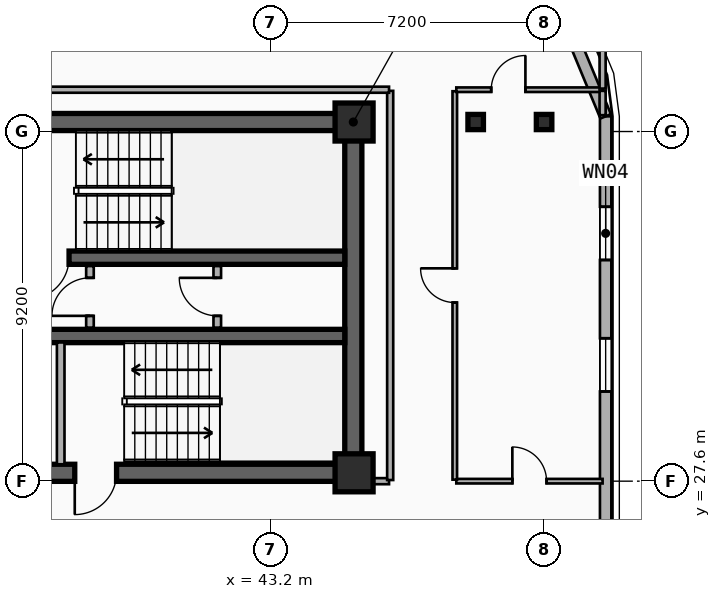
"""IFC4 building model, lengths in metres.
Left out: names, types, materials, properties, quantities, classifications, styles, units other than length and angle.
Written with IfcOpenShell. Run it as: python <this file> out.ifc"""

import sys

from ifc_helpers import new_model, si_unit, direction, frame, frame_2d, origin, origin_2d, place, context, subcontext, project, spatial, rectangle, i_section, extrude, element, fill, save


model = new_model("IFC4")
c1 = context("Model", 3, precision=1e-05, world=origin(), true_north=direction((0.0, 1.0)))
c2 = subcontext(c1, "Body", "Model", "MODEL_VIEW")
j1 = project(units=[si_unit("LENGTHUNIT", "METRE"), si_unit("PLANEANGLEUNIT", "RADIAN")], contexts=[c1])
p1 = place(None, origin())
s1 = spatial("IfcSite", under=j1, at=p1, CompositionType="ELEMENT")
p2 = place(p1, origin())
s2 = spatial("IfcBuilding", under=s1, at=p2, CompositionType="ELEMENT")
p3 = place(p2, frame((0.0, 0.0, 218.4)))
s3 = spatial("IfcBuildingStorey", under=s2, at=p3, CompositionType="ELEMENT", Elevation=218.4)
p4 = place(p3, frame((12.15, 37.05, 0.0), z_axis=(0.0, 0.0, 1.0), x_axis=(1.0, 0.0, 0.0)))
e1 = element("IfcWall", 1, at=p4, inside=s3, PredefinedType="SHEAR", context=c2, shape_type="SweptSolid", body=[
    extrude(rectangle(XDim=33.23, YDim=0.45, at=frame_2d((16.615, 0.0))), origin(), (0.0, 0.0, 1.0), 3.6),
])
p5 = place(p3, frame((45.38, 27.82, 0.0), z_axis=(0.0, 0.0, 1.0), x_axis=(-1.0, 0.0, 0.0)))
e2 = element("IfcWall", 2, at=p5, inside=s3, PredefinedType="SHEAR", context=c2, shape_type="SweptSolid", body=[
    extrude(rectangle(XDim=12.23, YDim=0.45, at=frame_2d((6.115, 0.0))), origin(), (0.0, 0.0, 1.0), 3.6),
])
p6 = place(p5, frame((9.93, 0.0, 0.0)))
e3 = element("IfcOpeningElement", 3, at=p6, cuts=e2, PredefinedType="OPENING", context=c2, shape_type="SweptSolid", body=[
    extrude(rectangle(XDim=1.1, YDim=2.15, at=frame_2d((0.55, 1.075))), frame((0.0, 0.235, 0.0), z_axis=(0.0, -1.0, 0.0), x_axis=(1.0, 0.0, 0.0)), (0.0, 0.0, 1.0), 0.47),
])
p7 = place(p5, frame((6.23, 0.0, 0.0)))
e4 = element("IfcOpeningElement", 4, at=p7, cuts=e2, PredefinedType="OPENING", context=c2, shape_type="SweptSolid", body=[
    extrude(rectangle(XDim=1.1, YDim=2.15, at=frame_2d((0.55, 1.075))), frame((0.0, 0.235, 0.0), z_axis=(0.0, -1.0, 0.0), x_axis=(1.0, 0.0, 0.0)), (0.0, 0.0, 1.0), 0.47),
])
p8 = place(p3, frame((45.38, 28.045, 0.0), z_axis=(0.0, 0.0, 1.0), x_axis=(0.0, 1.0, 0.0)))
e5 = element("IfcWall", 5, at=p8, inside=s3, PredefinedType="SHEAR", context=c2, shape_type="SweptSolid", body=[
    extrude(rectangle(XDim=8.78, YDim=0.45, at=frame_2d((4.39, 0.0))), origin(), (0.0, 0.0, 1.0), 3.6),
])
p9 = place(p3, frame((45.155, 33.48, 0.0), z_axis=(0.0, 0.0, 1.0), x_axis=(-1.0, 0.0, 0.0)))
e6 = element("IfcWall", 6, at=p9, inside=s3, PredefinedType="SHEAR", context=c2, shape_type="SweptSolid", body=[
    extrude(rectangle(XDim=8.6, YDim=0.35, at=frame_2d((4.3, 0.0))), origin(), (0.0, 0.0, 1.0), 3.6),
])
p10 = place(p9, frame((7.255, 0.0, 0.0)))
e7 = element("IfcOpeningElement", 7, at=p10, cuts=e6, PredefinedType="OPENING", context=c2, shape_type="SweptSolid", body=[
    extrude(rectangle(XDim=1.1, YDim=2.15, at=frame_2d((0.55, 1.075))), frame((0.0, 0.185, 0.0), z_axis=(0.0, -1.0, 0.0), x_axis=(1.0, 0.0, 0.0)), (0.0, 0.0, 1.0), 0.37),
])
p11 = place(p3, frame((36.555, 31.42, 0.0), z_axis=(0.0, 0.0, 1.0), x_axis=(1.0, 0.0, 0.0)))
e8 = element("IfcWall", 8, at=p11, inside=s3, PredefinedType="SHEAR", context=c2, shape_type="SweptSolid", body=[
    extrude(rectangle(XDim=8.6, YDim=0.35, at=frame_2d((4.3, 0.0))), origin(), (0.0, 0.0, 1.0), 3.6),
])
for number, where, z_axis, x_axis in (
    (9, (45.4, 27.82, 0.0), (0.0, 0.0, 1.0), (1.0, 0.0, 0.0)),
    (10, (45.4, 37.05, 0.0), (0.0, 0.0, 1.0), (1.0, 0.0, 0.0)),
):
    element("IfcColumn", number, at=place(p3, frame(where, z_axis=z_axis, x_axis=x_axis)), inside=s3, PredefinedType="COLUMN", context=c2, shape_type="SweptSolid", body=[
        extrude(rectangle(XDim=1.0, YDim=1.0, at=origin_2d()), origin(), (0.0, 0.0, 1.0), 3.6),
    ])
for number, where, z_axis, x_axis in (
    (11, (48.6, 37.05, 0.0), (0.0, 0.0, 1.0), (1.0, 0.0, 0.0)),
    (12, (50.4, 37.05, 0.0), (0.0, 0.0, 1.0), (1.0, 0.0, 0.0)),
):
    element("IfcColumn", number, at=place(p3, frame(where, z_axis=z_axis, x_axis=x_axis)), inside=s3, PredefinedType="COLUMN", context=c2, shape_type="SweptSolid", body=[
        extrude(i_section(OverallWidth=0.408, OverallDepth=0.4, WebThickness=0.025, FlangeThickness=0.039, FilletRadius=0.015, at=origin_2d()), origin(), (0.0, 0.0, 1.0), 3.6),
    ])
p12 = place(p3, frame((52.02, 37.2, 0.0), z_axis=(0.0, 0.0, 1.0), x_axis=(0.0, -1.0, 0.0)))
e13 = element("IfcWall", 13, at=p12, inside=s3, PredefinedType="SOLIDWALL", context=c2, shape_type="SweptSolid", body=[
    extrude(rectangle(XDim=28.6, YDim=0.3, at=frame_2d((14.3, 0.0))), origin(), (0.0, 0.0, 1.0), 3.34),
])
p13 = place(p12, frame((2.38, 0.0, 0.34)))
e14 = element("IfcOpeningElement", 14, at=p13, cuts=e13, PredefinedType="OPENING", context=c2, shape_type="SweptSolid", body=[
    extrude(rectangle(XDim=1.4, YDim=2.1, at=frame_2d((0.7, 1.05))), frame((0.0, 0.16, 0.0), z_axis=(0.0, -1.0, 0.0), x_axis=(1.0, 0.0, 0.0)), (0.0, 0.0, 1.0), 0.32),
])
p14 = place(p12, frame((5.84, 0.0, 0.34)))
e15 = element("IfcOpeningElement", 15, at=p14, cuts=e13, PredefinedType="OPENING", context=c2, shape_type="SweptSolid", body=[
    extrude(rectangle(XDim=1.4, YDim=2.1, at=frame_2d((0.7, 1.05))), frame((0.0, 0.16, 0.0), z_axis=(0.0, -1.0, 0.0), x_axis=(1.0, 0.0, 0.0)), (0.0, 0.0, 1.0), 0.32),
])
p15 = place(p12, frame((16.527, 0.0, 0.34)))
e16 = element("IfcOpeningElement", 16, at=p15, cuts=e13, PredefinedType="OPENING", context=c2, shape_type="SweptSolid", body=[
    extrude(rectangle(XDim=1.4, YDim=2.1, at=frame_2d((0.7, 1.05))), frame((0.0, 0.16, 0.0), z_axis=(0.0, -1.0, 0.0), x_axis=(1.0, 0.0, 0.0)), (0.0, 0.0, 1.0), 0.32),
])
p16 = place(p12, frame((22.403, 0.0, 0.34)))
e17 = element("IfcOpeningElement", 17, at=p16, cuts=e13, PredefinedType="OPENING", context=c2, shape_type="SweptSolid", body=[
    extrude(rectangle(XDim=1.4, YDim=2.1, at=frame_2d((0.7, 1.05))), frame((0.0, 0.16, 0.0), z_axis=(0.0, -1.0, 0.0), x_axis=(1.0, 0.0, 0.0)), (0.0, 0.0, 1.0), 0.32),
])
p17 = place(p3, frame((50.843, 40.042, 0.0), z_axis=(0.0, 0.0, 1.0), x_axis=(0.382704529509, -0.923870793506, 0.0)))
e18 = element("IfcWall", 18, at=p17, inside=s3, PredefinedType="SOLIDWALL", context=c2, shape_type="SweptSolid", body=[
    extrude(rectangle(XDim=3.077, YDim=0.3, at=frame_2d((1.538, 0.0))), origin(), (0.0, 0.0, 1.0), 3.34),
])
p18 = place(p3, frame((37.68, 28.045, 0.0), z_axis=(0.0, 0.0, 1.0), x_axis=(0.0, 1.0, 0.0)))
e19 = element("IfcWall", 19, at=p18, inside=s3, PredefinedType="PARTITIONING", context=c2, shape_type="SweptSolid", body=[
    extrude(rectangle(XDim=3.205, YDim=0.2, at=frame_2d((1.603, 0.0))), origin(), (0.0, 0.0, 1.0), 2.72),
])
p19 = place(p3, frame((38.45, 31.64, 0.0), z_axis=(0.0, 0.0, 1.0), x_axis=(0.0, 1.0, 0.0)))
e20 = element("IfcWall", 20, at=p19, inside=s3, PredefinedType="PARTITIONING", context=c2, shape_type="SweptSolid", body=[
    extrude(rectangle(XDim=1.62, YDim=0.2, at=frame_2d((0.81, 0.0))), origin(), (0.0, 0.0, 1.0), 3.34),
])
p20 = place(p19, frame((0.31, 0.0, 0.0)))
e21 = element("IfcOpeningElement", 21, at=p20, cuts=e20, PredefinedType="OPENING", context=c2, shape_type="SweptSolid", body=[
    extrude(rectangle(XDim=1.0, YDim=2.15, at=frame_2d((0.5, 1.075))), frame((0.0, 0.11, 0.0), z_axis=(0.0, -1.0, 0.0), x_axis=(1.0, 0.0, 0.0)), (0.0, 0.0, 1.0), 0.22),
])
p21 = place(p3, frame((41.8, 31.64, 0.0), z_axis=(0.0, 0.0, 1.0), x_axis=(0.0, 1.0, 0.0)))
e22 = element("IfcWall", 22, at=p21, inside=s3, PredefinedType="PARTITIONING", context=c2, shape_type="SweptSolid", body=[
    extrude(rectangle(XDim=1.62, YDim=0.2, at=frame_2d((0.81, 0.0))), origin(), (0.0, 0.0, 1.0), 3.34),
])
p22 = place(p21, frame((0.31, 0.0, 0.0)))
e23 = element("IfcOpeningElement", 23, at=p22, cuts=e22, PredefinedType="OPENING", context=c2, shape_type="SweptSolid", body=[
    extrude(rectangle(XDim=1.0, YDim=2.15, at=frame_2d((0.5, 1.075))), frame((0.0, 0.11, 0.0), z_axis=(0.0, -1.0, 0.0), x_axis=(1.0, 0.0, 0.0)), (0.0, 0.0, 1.0), 0.22),
])
p23 = place(p3, frame((48.09, 27.6, 0.0), z_axis=(0.0, 0.0, 1.0), x_axis=(1.0, 0.0, 0.0)))
e24 = element("IfcWall", 24, at=p23, inside=s3, PredefinedType="PARTITIONING", context=c2, shape_type="SweptSolid", body=[
    extrude(rectangle(XDim=3.85, YDim=0.12, at=frame_2d((1.925, 0.0))), origin(), (0.0, 0.0, 1.0), 2.67),
])
p24 = place(p23, frame((1.475, 0.0, 0.0)))
e25 = element("IfcOpeningElement", 25, at=p24, cuts=e24, PredefinedType="OPENING", context=c2, shape_type="SweptSolid", body=[
    extrude(rectangle(XDim=0.9, YDim=2.1, at=frame_2d((0.45, 1.05))), frame((0.0, 0.07, 0.0), z_axis=(0.0, -1.0, 0.0), x_axis=(1.0, 0.0, 0.0)), (0.0, 0.0, 1.0), 0.14),
])
p25 = place(p3, frame((48.05, 27.64, 0.0), z_axis=(0.0, 0.0, 1.0), x_axis=(0.0, 1.0, 0.0)))
e26 = element("IfcWall", 26, at=p25, inside=s3, PredefinedType="PARTITIONING", context=c2, shape_type="SweptSolid", body=[
    extrude(rectangle(XDim=10.22, YDim=0.12, at=frame_2d((5.11, 0.0))), origin(), (0.0, 0.0, 1.0), 2.82),
])
p26 = place(p25, frame((4.66, 0.0, 0.0)))
e27 = element("IfcOpeningElement", 27, at=p26, cuts=e26, PredefinedType="OPENING", context=c2, shape_type="SweptSolid", body=[
    extrude(rectangle(XDim=0.9, YDim=2.1, at=frame_2d((0.45, 1.05))), frame((0.0, 0.07, 0.0), z_axis=(0.0, -1.0, 0.0), x_axis=(1.0, 0.0, 0.0)), (0.0, 0.0, 1.0), 0.14),
])
p27 = place(p3, frame((48.09, 37.9, 0.0), z_axis=(0.0, 0.0, 1.0), x_axis=(1.0, 0.0, 0.0)))
e28 = element("IfcWall", 28, at=p27, inside=s3, PredefinedType="PARTITIONING", context=c2, shape_type="SweptSolid", body=[
    extrude(rectangle(XDim=3.85, YDim=0.12, at=frame_2d((1.925, 0.0))), origin(), (0.0, 0.0, 1.0), 3.34),
])
p28 = place(p27, frame((0.919, 0.0, 0.0)))
e29 = element("IfcOpeningElement", 29, at=p28, cuts=e28, PredefinedType="OPENING", context=c2, shape_type="SweptSolid", body=[
    extrude(rectangle(XDim=0.9, YDim=2.1, at=frame_2d((0.45, 1.05))), frame((0.0, 0.07, 0.0), z_axis=(0.0, -1.0, 0.0), x_axis=(1.0, 0.0, 0.0)), (0.0, 0.0, 1.0), 0.14),
])
p29 = place(p3, frame((45.41, 27.6, 0.0), z_axis=(0.0, 0.0, 1.0), x_axis=(1.0, 0.0, 0.0)))
e30 = element("IfcWall", 30, at=p29, inside=s3, PredefinedType="PARTITIONING", context=c2, shape_type="SweptSolid", body=[
    extrude(rectangle(XDim=0.91, YDim=0.16, at=frame_2d((0.455, 0.0))), origin(), (0.0, 0.0, 1.0), 2.41),
])
p30 = place(p3, frame((46.35, 27.63, 0.0), z_axis=(0.0, 0.0, 1.0), x_axis=(0.0, 1.0, 0.0)))
e31 = element("IfcWall", 31, at=p30, inside=s3, PredefinedType="PARTITIONING", context=c2, shape_type="SweptSolid", body=[
    extrude(rectangle(XDim=10.24, YDim=0.16, at=frame_2d((5.12, 0.0))), origin(), (0.0, 0.0, 1.0), 2.82),
])
p31 = place(p3, frame((11.28, 37.9, 0.0), z_axis=(0.0, 0.0, 1.0), x_axis=(1.0, 0.0, 0.0)))
e32 = element("IfcWall", 32, at=p31, inside=s3, PredefinedType="PARTITIONING", context=c2, shape_type="SweptSolid", body=[
    extrude(rectangle(XDim=35.04, YDim=0.16, at=frame_2d((17.52, 0.0))), origin(), (0.0, 0.0, 1.0), 3.34),
])
p32 = place(p3, frame((51.94, 37.93, 0.0), z_axis=(0.0, 0.0, 1.0), x_axis=(0.0, 1.0, 0.0)))
e33 = element("IfcWall", 33, at=p32, inside=s3, PredefinedType="PARTITIONING", context=c2, shape_type="SweptSolid", body=[
    extrude(rectangle(XDim=1.44, YDim=0.16, at=frame_2d((0.72, 0.0))), origin(), (0.0, 0.0, 1.0), 3.34),
])
p33 = place(p3, frame((51.94, 37.23, 0.0), z_axis=(0.0, 0.0, 1.0), x_axis=(0.0, 1.0, 0.0)))
e34 = element("IfcWall", 34, at=p33, inside=s3, PredefinedType="PARTITIONING", context=c2, shape_type="SweptSolid", body=[
    extrude(rectangle(XDim=0.64, YDim=0.16, at=frame_2d((0.32, 0.0))), origin(), (0.0, 0.0, 1.0), 3.34),
])
p34 = place(p13, origin())
e35 = element("IfcWindow", 35, at=p34, inside=s3, PartitioningType="SINGLE_PANEL", PredefinedType="WINDOW", context=c2, shape_type="SweptSolid", body=[
    extrude(rectangle(XDim=1.4, YDim=2.1, at=frame_2d((0.7, 1.05))), frame((0.0, 0.03, 0.0), z_axis=(0.0, -1.0, 0.0), x_axis=(1.0, 0.0, 0.0)), (0.0, 0.0, 1.0), 0.06),
])
fill(e14, e35)
p35 = place(p14, origin())
e36 = element("IfcWindow", 36, at=p35, inside=s3, PartitioningType="SINGLE_PANEL", PredefinedType="WINDOW", context=c2, shape_type="SweptSolid", body=[
    extrude(rectangle(XDim=1.4, YDim=2.1, at=frame_2d((0.7, 1.05))), frame((0.0, 0.03, 0.0), z_axis=(0.0, -1.0, 0.0), x_axis=(1.0, 0.0, 0.0)), (0.0, 0.0, 1.0), 0.06),
])
fill(e15, e36)
p36 = place(p10, origin())
e37 = element("IfcDoor", 37, at=p36, inside=s3, OperationType="SINGLE_SWING_RIGHT", PredefinedType="DOOR", context=c2, shape_type="SweptSolid", body=[
    extrude(rectangle(XDim=1.1, YDim=2.15, at=frame_2d((0.55, 1.075))), frame((0.0, 0.025, 0.0), z_axis=(0.0, -1.0, 0.0), x_axis=(1.0, 0.0, 0.0)), (0.0, 0.0, 1.0), 0.05),
])
fill(e7, e37)
p37 = place(p7, origin())
e38 = element("IfcDoor", 38, at=p37, inside=s3, OperationType="SINGLE_SWING_RIGHT", PredefinedType="DOOR", context=c2, shape_type="SweptSolid", body=[
    extrude(rectangle(XDim=1.1, YDim=2.15, at=frame_2d((0.55, 1.075))), frame((0.0, 0.025, 0.0), z_axis=(0.0, -1.0, 0.0), x_axis=(1.0, 0.0, 0.0)), (0.0, 0.0, 1.0), 0.05),
])
fill(e4, e38)
p38 = place(p20, origin())
e39 = element("IfcDoor", 39, at=p38, inside=s3, OperationType="SINGLE_SWING_LEFT", PredefinedType="DOOR", context=c2, shape_type="SweptSolid", body=[
    extrude(rectangle(XDim=1.0, YDim=2.15, at=frame_2d((0.5, 1.075))), frame((0.0, 0.025, 0.0), z_axis=(0.0, -1.0, 0.0), x_axis=(1.0, 0.0, 0.0)), (0.0, 0.0, 1.0), 0.05),
])
fill(e21, e39)
p39 = place(p22, origin())
e40 = element("IfcDoor", 40, at=p39, inside=s3, OperationType="SINGLE_SWING_RIGHT", PredefinedType="DOOR", context=c2, shape_type="SweptSolid", body=[
    extrude(rectangle(XDim=1.0, YDim=2.15, at=frame_2d((0.5, 1.075))), frame((0.0, 0.025, 0.0), z_axis=(0.0, -1.0, 0.0), x_axis=(1.0, 0.0, 0.0)), (0.0, 0.0, 1.0), 0.05),
])
fill(e23, e40)
p40 = place(p24, origin())
e41 = element("IfcDoor", 41, at=p40, inside=s3, OperationType="SINGLE_SWING_LEFT", PredefinedType="DOOR", context=c2, shape_type="SweptSolid", body=[
    extrude(rectangle(XDim=0.9, YDim=2.1, at=frame_2d((0.45, 1.05))), frame((0.0, 0.025, 0.0), z_axis=(0.0, -1.0, 0.0), x_axis=(1.0, 0.0, 0.0)), (0.0, 0.0, 1.0), 0.05),
])
fill(e25, e41)
p41 = place(p26, origin())
e42 = element("IfcDoor", 42, at=p41, inside=s3, OperationType="SINGLE_SWING_RIGHT", PredefinedType="DOOR", context=c2, shape_type="SweptSolid", body=[
    extrude(rectangle(XDim=0.9, YDim=2.1, at=frame_2d((0.45, 1.05))), frame((0.0, 0.025, 0.0), z_axis=(0.0, -1.0, 0.0), x_axis=(1.0, 0.0, 0.0)), (0.0, 0.0, 1.0), 0.05),
])
fill(e27, e42)
p42 = place(p28, origin())
e43 = element("IfcDoor", 43, at=p42, inside=s3, OperationType="SINGLE_SWING_RIGHT", PredefinedType="DOOR", context=c2, shape_type="SweptSolid", body=[
    extrude(rectangle(XDim=0.9, YDim=2.1, at=frame_2d((0.45, 1.05))), frame((0.0, 0.025, 0.0), z_axis=(0.0, -1.0, 0.0), x_axis=(1.0, 0.0, 0.0)), (0.0, 0.0, 1.0), 0.05),
])
fill(e29, e43)
save(model, sys.argv[1])
